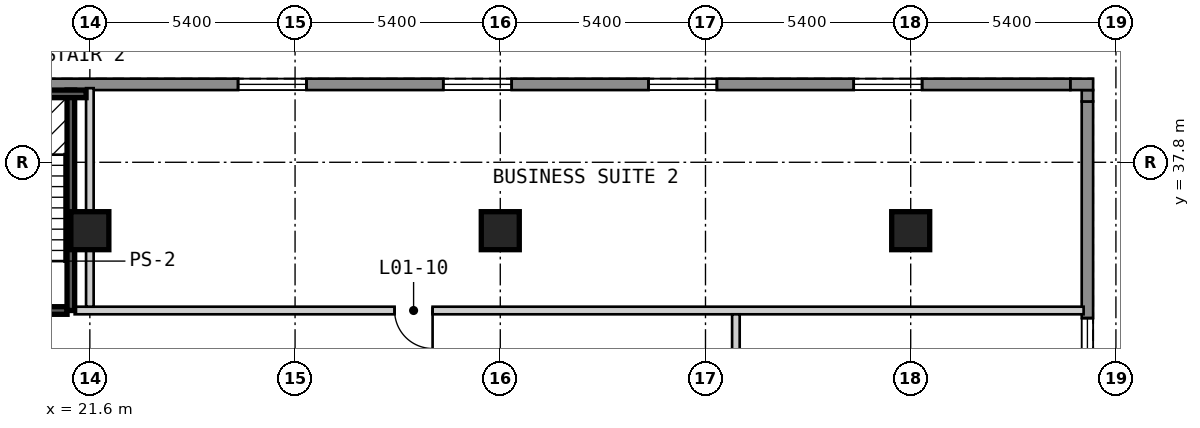
"""IFC4 building model, lengths in metres.
Left out: names, types, materials, properties, quantities, classifications, styles, units other than length and angle.
Written with IfcOpenShell. Run it as: python <this file> out.ifc"""

import sys

from ifc_helpers import new_model, si_unit, direction, frame, frame_2d, origin, origin_2d, place, context, subcontext, project, spatial, rectangle, extrude, element, fill, save


model = new_model("IFC4")
c1 = context("Model", 3, precision=1e-05, world=origin(), true_north=direction((0.0, 1.0)))
c2 = subcontext(c1, "Body", "Model", "MODEL_VIEW")
j1 = project(units=[si_unit("LENGTHUNIT", "METRE"), si_unit("PLANEANGLEUNIT", "RADIAN")], contexts=[c1])
p1 = place(None, origin())
s1 = spatial("IfcSite", under=j1, at=p1, CompositionType="ELEMENT")
p2 = place(p1, origin())
s2 = spatial("IfcBuilding", under=s1, at=p2, CompositionType="ELEMENT")
p3 = place(p2, frame((0.0, 0.0, 5.0)))
s3 = spatial("IfcBuildingStorey", under=s2, at=p3, CompositionType="ELEMENT", Elevation=5.0)
for number, where, z_axis, x_axis in (
    (1, (21.6, 36.0, 0.0), (0.0, 0.0, 1.0), (1.0, 0.0, 0.0)),
    (2, (32.4, 36.0, 0.0), (0.0, 0.0, 1.0), (1.0, 0.0, 0.0)),
    (3, (43.2, 36.0, 0.0), (0.0, 0.0, 1.0), (1.0, 0.0, 0.0)),
):
    element("IfcColumn", number, at=place(p3, frame(where, z_axis=z_axis, x_axis=x_axis)), inside=s3, PredefinedType="COLUMN", context=c2, shape_type="SweptSolid", body=[
        extrude(rectangle(XDim=1.0, YDim=1.0, at=origin_2d()), origin(), (0.0, 0.0, 1.0), 4.0),
    ])
p4 = place(p3, frame((47.85, -31.4, 0.0), z_axis=(0.0, 0.0, 1.0), x_axis=(0.0, 1.0, 0.0)))
e4 = element("IfcWall", 4, at=p4, inside=s3, PredefinedType="SOLIDWALL", context=c2, shape_type="SweptSolid", body=[
    extrude(rectangle(XDim=70.8, YDim=0.3, at=frame_2d((35.4, 0.0))), origin(), (0.0, 0.0, 1.0), 3.5),
])
p5 = place(p4, frame((3.9, 0.0, 0.9)))
e5 = element("IfcOpeningElement", 5, at=p5, cuts=e4, PredefinedType="OPENING", context=c2, shape_type="SweptSolid", body=[
    extrude(rectangle(XDim=1.8, YDim=2.4, at=frame_2d((0.9, 1.2))), frame((0.0, 0.16, 0.0), z_axis=(0.0, -1.0, 0.0), x_axis=(1.0, 0.0, 0.0)), (0.0, 0.0, 1.0), 0.32),
])
p6 = place(p4, frame((9.3, 0.0, 0.9)))
e6 = element("IfcOpeningElement", 6, at=p6, cuts=e4, PredefinedType="OPENING", context=c2, shape_type="SweptSolid", body=[
    extrude(rectangle(XDim=1.8, YDim=2.4, at=frame_2d((0.9, 1.2))), frame((0.0, 0.16, 0.0), z_axis=(0.0, -1.0, 0.0), x_axis=(1.0, 0.0, 0.0)), (0.0, 0.0, 1.0), 0.32),
])
p7 = place(p4, frame((14.7, 0.0, 0.9)))
e7 = element("IfcOpeningElement", 7, at=p7, cuts=e4, PredefinedType="OPENING", context=c2, shape_type="SweptSolid", body=[
    extrude(rectangle(XDim=1.8, YDim=2.4, at=frame_2d((0.9, 1.2))), frame((0.0, 0.16, 0.0), z_axis=(0.0, -1.0, 0.0), x_axis=(1.0, 0.0, 0.0)), (0.0, 0.0, 1.0), 0.32),
])
p8 = place(p4, frame((20.1, 0.0, 0.9)))
e8 = element("IfcOpeningElement", 8, at=p8, cuts=e4, PredefinedType="OPENING", context=c2, shape_type="SweptSolid", body=[
    extrude(rectangle(XDim=1.8, YDim=2.4, at=frame_2d((0.9, 1.2))), frame((0.0, 0.16, 0.0), z_axis=(0.0, -1.0, 0.0), x_axis=(1.0, 0.0, 0.0)), (0.0, 0.0, 1.0), 0.32),
])
p9 = place(p4, frame((25.5, 0.0, 0.9)))
e9 = element("IfcOpeningElement", 9, at=p9, cuts=e4, PredefinedType="OPENING", context=c2, shape_type="SweptSolid", body=[
    extrude(rectangle(XDim=1.8, YDim=2.4, at=frame_2d((0.9, 1.2))), frame((0.0, 0.16, 0.0), z_axis=(0.0, -1.0, 0.0), x_axis=(1.0, 0.0, 0.0)), (0.0, 0.0, 1.0), 0.32),
])
p10 = place(p4, frame((30.9, 0.0, 0.9)))
e10 = element("IfcOpeningElement", 10, at=p10, cuts=e4, PredefinedType="OPENING", context=c2, shape_type="SweptSolid", body=[
    extrude(rectangle(XDim=1.8, YDim=2.4, at=frame_2d((0.9, 1.2))), frame((0.0, 0.16, 0.0), z_axis=(0.0, -1.0, 0.0), x_axis=(1.0, 0.0, 0.0)), (0.0, 0.0, 1.0), 0.32),
])
p11 = place(p4, frame((36.3, 0.0, 0.9)))
e11 = element("IfcOpeningElement", 11, at=p11, cuts=e4, PredefinedType="OPENING", context=c2, shape_type="SweptSolid", body=[
    extrude(rectangle(XDim=1.8, YDim=2.4, at=frame_2d((0.9, 1.2))), frame((0.0, 0.16, 0.0), z_axis=(0.0, -1.0, 0.0), x_axis=(1.0, 0.0, 0.0)), (0.0, 0.0, 1.0), 0.32),
])
p12 = place(p4, frame((41.7, 0.0, 0.9)))
e12 = element("IfcOpeningElement", 12, at=p12, cuts=e4, PredefinedType="OPENING", context=c2, shape_type="SweptSolid", body=[
    extrude(rectangle(XDim=1.8, YDim=2.4, at=frame_2d((0.9, 1.2))), frame((0.0, 0.16, 0.0), z_axis=(0.0, -1.0, 0.0), x_axis=(1.0, 0.0, 0.0)), (0.0, 0.0, 1.0), 0.32),
])
p13 = place(p4, frame((47.1, 0.0, 0.9)))
e13 = element("IfcOpeningElement", 13, at=p13, cuts=e4, PredefinedType="OPENING", context=c2, shape_type="SweptSolid", body=[
    extrude(rectangle(XDim=1.8, YDim=2.4, at=frame_2d((0.9, 1.2))), frame((0.0, 0.16, 0.0), z_axis=(0.0, -1.0, 0.0), x_axis=(1.0, 0.0, 0.0)), (0.0, 0.0, 1.0), 0.32),
])
p14 = place(p4, frame((57.9, 0.0, 0.9)))
e14 = element("IfcOpeningElement", 14, at=p14, cuts=e4, PredefinedType="OPENING", context=c2, shape_type="SweptSolid", body=[
    extrude(rectangle(XDim=1.8, YDim=2.4, at=frame_2d((0.9, 1.2))), frame((0.0, 0.16, 0.0), z_axis=(0.0, -1.0, 0.0), x_axis=(1.0, 0.0, 0.0)), (0.0, 0.0, 1.0), 0.32),
])
p15 = place(p4, frame((63.3, 0.0, 0.9)))
e15 = element("IfcOpeningElement", 15, at=p15, cuts=e4, PredefinedType="OPENING", context=c2, shape_type="SweptSolid", body=[
    extrude(rectangle(XDim=1.8, YDim=2.4, at=frame_2d((0.9, 1.2))), frame((0.0, 0.16, 0.0), z_axis=(0.0, -1.0, 0.0), x_axis=(1.0, 0.0, 0.0)), (0.0, 0.0, 1.0), 0.32),
])
p16 = place(p3, frame((47.85, 39.4, 0.0), z_axis=(0.0, 0.0, 1.0), x_axis=(0.0, 1.0, 0.0)))
e16 = element("IfcWall", 16, at=p16, inside=s3, PredefinedType="SOLIDWALL", context=c2, shape_type="SweptSolid", body=[
    extrude(rectangle(XDim=0.3, YDim=0.3, at=frame_2d((0.15, 0.0))), origin(), (0.0, 0.0, 1.0), 3.5),
])
p17 = place(p3, frame((48.0, 39.85, 0.0), z_axis=(0.0, 0.0, 1.0), x_axis=(-1.0, 0.0, 0.0)))
e17 = element("IfcWall", 17, at=p17, inside=s3, PredefinedType="SOLIDWALL", context=c2, shape_type="SweptSolid", body=[
    extrude(rectangle(XDim=0.6, YDim=0.3, at=frame_2d((0.3, 0.0))), origin(), (0.0, 0.0, 1.0), 3.5),
])
p18 = place(p3, frame((47.4, 39.85, 0.0), z_axis=(0.0, 0.0, 1.0), x_axis=(-1.0, 0.0, 0.0)))
e18 = element("IfcWall", 18, at=p18, inside=s3, PredefinedType="SOLIDWALL", context=c2, shape_type="SweptSolid", body=[
    extrude(rectangle(XDim=94.8, YDim=0.3, at=frame_2d((47.4, 0.0))), origin(), (0.0, 0.0, 1.0), 3.5),
])
p19 = place(p18, frame((3.9, 0.0, 0.9)))
e19 = element("IfcOpeningElement", 19, at=p19, cuts=e18, PredefinedType="OPENING", context=c2, shape_type="SweptSolid", body=[
    extrude(rectangle(XDim=1.8, YDim=2.4, at=frame_2d((0.9, 1.2))), frame((0.0, 0.16, 0.0), z_axis=(0.0, -1.0, 0.0), x_axis=(1.0, 0.0, 0.0)), (0.0, 0.0, 1.0), 0.32),
])
p20 = place(p18, frame((9.3, 0.0, 0.9)))
e20 = element("IfcOpeningElement", 20, at=p20, cuts=e18, PredefinedType="OPENING", context=c2, shape_type="SweptSolid", body=[
    extrude(rectangle(XDim=1.8, YDim=2.4, at=frame_2d((0.9, 1.2))), frame((0.0, 0.16, 0.0), z_axis=(0.0, -1.0, 0.0), x_axis=(1.0, 0.0, 0.0)), (0.0, 0.0, 1.0), 0.32),
])
p21 = place(p18, frame((14.7, 0.0, 0.9)))
e21 = element("IfcOpeningElement", 21, at=p21, cuts=e18, PredefinedType="OPENING", context=c2, shape_type="SweptSolid", body=[
    extrude(rectangle(XDim=1.8, YDim=2.4, at=frame_2d((0.9, 1.2))), frame((0.0, 0.16, 0.0), z_axis=(0.0, -1.0, 0.0), x_axis=(1.0, 0.0, 0.0)), (0.0, 0.0, 1.0), 0.32),
])
p22 = place(p18, frame((20.1, 0.0, 0.9)))
e22 = element("IfcOpeningElement", 22, at=p22, cuts=e18, PredefinedType="OPENING", context=c2, shape_type="SweptSolid", body=[
    extrude(rectangle(XDim=1.8, YDim=2.4, at=frame_2d((0.9, 1.2))), frame((0.0, 0.16, 0.0), z_axis=(0.0, -1.0, 0.0), x_axis=(1.0, 0.0, 0.0)), (0.0, 0.0, 1.0), 0.32),
])
p23 = place(p18, frame((30.9, 0.0, 0.9)))
e23 = element("IfcOpeningElement", 23, at=p23, cuts=e18, PredefinedType="OPENING", context=c2, shape_type="SweptSolid", body=[
    extrude(rectangle(XDim=1.8, YDim=2.4, at=frame_2d((0.9, 1.2))), frame((0.0, 0.16, 0.0), z_axis=(0.0, -1.0, 0.0), x_axis=(1.0, 0.0, 0.0)), (0.0, 0.0, 1.0), 0.32),
])
p24 = place(p18, frame((36.3, 0.0, 0.9)))
e24 = element("IfcOpeningElement", 24, at=p24, cuts=e18, PredefinedType="OPENING", context=c2, shape_type="SweptSolid", body=[
    extrude(rectangle(XDim=1.8, YDim=2.4, at=frame_2d((0.9, 1.2))), frame((0.0, 0.16, 0.0), z_axis=(0.0, -1.0, 0.0), x_axis=(1.0, 0.0, 0.0)), (0.0, 0.0, 1.0), 0.32),
])
p25 = place(p18, frame((41.7, 0.0, 0.9)))
e25 = element("IfcOpeningElement", 25, at=p25, cuts=e18, PredefinedType="OPENING", context=c2, shape_type="SweptSolid", body=[
    extrude(rectangle(XDim=1.8, YDim=2.4, at=frame_2d((0.9, 1.2))), frame((0.0, 0.16, 0.0), z_axis=(0.0, -1.0, 0.0), x_axis=(1.0, 0.0, 0.0)), (0.0, 0.0, 1.0), 0.32),
])
p26 = place(p18, frame((47.1, 0.0, 0.9)))
e26 = element("IfcOpeningElement", 26, at=p26, cuts=e18, PredefinedType="OPENING", context=c2, shape_type="SweptSolid", body=[
    extrude(rectangle(XDim=1.8, YDim=2.4, at=frame_2d((0.9, 1.2))), frame((0.0, 0.16, 0.0), z_axis=(0.0, -1.0, 0.0), x_axis=(1.0, 0.0, 0.0)), (0.0, 0.0, 1.0), 0.32),
])
p27 = place(p18, frame((52.5, 0.0, 0.9)))
e27 = element("IfcOpeningElement", 27, at=p27, cuts=e18, PredefinedType="OPENING", context=c2, shape_type="SweptSolid", body=[
    extrude(rectangle(XDim=1.8, YDim=2.4, at=frame_2d((0.9, 1.2))), frame((0.0, 0.16, 0.0), z_axis=(0.0, -1.0, 0.0), x_axis=(1.0, 0.0, 0.0)), (0.0, 0.0, 1.0), 0.32),
])
p28 = place(p18, frame((57.9, 0.0, 0.9)))
e28 = element("IfcOpeningElement", 28, at=p28, cuts=e18, PredefinedType="OPENING", context=c2, shape_type="SweptSolid", body=[
    extrude(rectangle(XDim=1.8, YDim=2.4, at=frame_2d((0.9, 1.2))), frame((0.0, 0.16, 0.0), z_axis=(0.0, -1.0, 0.0), x_axis=(1.0, 0.0, 0.0)), (0.0, 0.0, 1.0), 0.32),
])
p29 = place(p18, frame((63.3, 0.0, 0.9)))
e29 = element("IfcOpeningElement", 29, at=p29, cuts=e18, PredefinedType="OPENING", context=c2, shape_type="SweptSolid", body=[
    extrude(rectangle(XDim=1.8, YDim=2.4, at=frame_2d((0.9, 1.2))), frame((0.0, 0.16, 0.0), z_axis=(0.0, -1.0, 0.0), x_axis=(1.0, 0.0, 0.0)), (0.0, 0.0, 1.0), 0.32),
])
p30 = place(p18, frame((74.1, 0.0, 0.9)))
e30 = element("IfcOpeningElement", 30, at=p30, cuts=e18, PredefinedType="OPENING", context=c2, shape_type="SweptSolid", body=[
    extrude(rectangle(XDim=1.8, YDim=2.4, at=frame_2d((0.9, 1.2))), frame((0.0, 0.16, 0.0), z_axis=(0.0, -1.0, 0.0), x_axis=(1.0, 0.0, 0.0)), (0.0, 0.0, 1.0), 0.32),
])
p31 = place(p18, frame((79.5, 0.0, 0.9)))
e31 = element("IfcOpeningElement", 31, at=p31, cuts=e18, PredefinedType="OPENING", context=c2, shape_type="SweptSolid", body=[
    extrude(rectangle(XDim=1.8, YDim=2.4, at=frame_2d((0.9, 1.2))), frame((0.0, 0.16, 0.0), z_axis=(0.0, -1.0, 0.0), x_axis=(1.0, 0.0, 0.0)), (0.0, 0.0, 1.0), 0.32),
])
p32 = place(p18, frame((84.9, 0.0, 0.9)))
e32 = element("IfcOpeningElement", 32, at=p32, cuts=e18, PredefinedType="OPENING", context=c2, shape_type="SweptSolid", body=[
    extrude(rectangle(XDim=1.8, YDim=2.4, at=frame_2d((0.9, 1.2))), frame((0.0, 0.16, 0.0), z_axis=(0.0, -1.0, 0.0), x_axis=(1.0, 0.0, 0.0)), (0.0, 0.0, 1.0), 0.32),
])
p33 = place(p18, frame((90.3, 0.0, 0.9)))
e33 = element("IfcOpeningElement", 33, at=p33, cuts=e18, PredefinedType="OPENING", context=c2, shape_type="SweptSolid", body=[
    extrude(rectangle(XDim=1.8, YDim=2.4, at=frame_2d((0.9, 1.2))), frame((0.0, 0.16, 0.0), z_axis=(0.0, -1.0, 0.0), x_axis=(1.0, 0.0, 0.0)), (0.0, 0.0, 1.0), 0.32),
])
p34 = place(p3, frame((-21.0, 33.9, 0.0), z_axis=(0.0, 0.0, 1.0), x_axis=(1.0, 0.0, 0.0)))
e34 = element("IfcWall", 34, at=p34, inside=s3, PredefinedType="SOLIDWALL", context=c2, shape_type="SweptSolid", body=[
    extrude(rectangle(XDim=42.0, YDim=0.2, at=frame_2d((21.0, 0.0))), origin(), (0.0, 0.0, 1.0), 3.5),
])
p35 = place(p34, frame((7.6, 0.0, 0.0)))
e35 = element("IfcOpeningElement", 35, at=p35, cuts=e34, PredefinedType="OPENING", context=c2, shape_type="SweptSolid", body=[
    extrude(rectangle(XDim=1.0, YDim=2.1, at=frame_2d((0.5, 1.05))), frame((0.0, 0.11, 0.0), z_axis=(0.0, -1.0, 0.0), x_axis=(1.0, 0.0, 0.0)), (0.0, 0.0, 1.0), 0.22),
])
p36 = place(p34, frame((25.85, 0.0, 0.0)))
e36 = element("IfcOpeningElement", 36, at=p36, cuts=e34, PredefinedType="OPENING", context=c2, shape_type="SweptSolid", body=[
    extrude(rectangle(XDim=1.0, YDim=2.1, at=frame_2d((0.5, 1.05))), frame((0.0, 0.11, 0.0), z_axis=(0.0, -1.0, 0.0), x_axis=(1.0, 0.0, 0.0)), (0.0, 0.0, 1.0), 0.22),
])
p37 = place(p34, frame((0.893, 0.0, 0.0)))
e37 = element("IfcOpeningElement", 37, at=p37, cuts=e34, PredefinedType="OPENING", context=c2, shape_type="SweptSolid", body=[
    extrude(rectangle(XDim=1.0, YDim=2.1, at=frame_2d((0.5, 1.05))), frame((0.0, 0.11, 0.0), z_axis=(0.0, -1.0, 0.0), x_axis=(1.0, 0.0, 0.0)), (0.0, 0.0, 1.0), 0.22),
])
p38 = place(p34, frame((40.107, 0.0, 0.0)))
e38 = element("IfcOpeningElement", 38, at=p38, cuts=e34, PredefinedType="OPENING", context=c2, shape_type="SweptSolid", body=[
    extrude(rectangle(XDim=1.0, YDim=2.1, at=frame_2d((0.5, 1.05))), frame((0.0, 0.11, 0.0), z_axis=(0.0, -1.0, 0.0), x_axis=(1.0, 0.0, 0.0)), (0.0, 0.0, 1.0), 0.22),
])
p39 = place(p3, frame((21.2, 33.9, 0.0), z_axis=(0.0, 0.0, 1.0), x_axis=(1.0, 0.0, 0.0)))
e39 = element("IfcWall", 39, at=p39, inside=s3, PredefinedType="PARTITIONING", context=c2, shape_type="SweptSolid", body=[
    extrude(rectangle(XDim=26.55, YDim=0.2, at=frame_2d((13.275, 0.0))), origin(), (0.0, 0.0, 1.0), 3.5),
])
p40 = place(p39, frame((8.419, 0.0, 0.0)))
e40 = element("IfcOpeningElement", 40, at=p40, cuts=e39, PredefinedType="OPENING", context=c2, shape_type="SweptSolid", body=[
    extrude(rectangle(XDim=1.0, YDim=2.1, at=frame_2d((0.5, 1.05))), frame((0.0, 0.11, 0.0), z_axis=(0.0, -1.0, 0.0), x_axis=(1.0, 0.0, 0.0)), (0.0, 0.0, 1.0), 0.22),
])
p41 = place(p3, frame((21.1, 33.9, 0.0), z_axis=(0.0, 0.0, 1.0), x_axis=(0.0, 1.0, 0.0)))
e41 = element("IfcWall", 41, at=p41, inside=s3, PredefinedType="SOLIDWALL", context=c2, shape_type="SweptSolid", body=[
    extrude(rectangle(XDim=5.8, YDim=0.2, at=frame_2d((2.9, 0.0))), origin(), (0.0, 0.0, 1.0), 3.5),
])
p42 = place(p3, frame((21.6, 34.0, 0.0), z_axis=(0.0, 0.0, 1.0), x_axis=(0.0, 1.0, 0.0)))
e42 = element("IfcWall", 42, at=p42, inside=s3, PredefinedType="PARTITIONING", context=c2, shape_type="SweptSolid", body=[
    extrude(rectangle(XDim=5.75, YDim=0.2, at=frame_2d((2.875, 0.0))), origin(), (0.0, 0.0, 1.0), 3.5),
])
p43 = place(p3, frame((38.6, -31.75, 0.0), z_axis=(0.0, 0.0, 1.0), x_axis=(0.0, 1.0, 0.0)))
e43 = element("IfcWall", 43, at=p43, inside=s3, PredefinedType="PARTITIONING", context=c2, shape_type="SweptSolid", body=[
    extrude(rectangle(XDim=65.55, YDim=0.2, at=frame_2d((32.775, 0.0))), origin(), (0.0, 0.0, 1.0), 3.5),
])
p44 = place(p43, frame((4.794, 0.0, 0.0), z_axis=(0.0, 0.0, 1.0), x_axis=(-1.0, 0.0, 0.0)))
e44 = element("IfcOpeningElement", 44, at=p44, cuts=e43, PredefinedType="OPENING", context=c2, shape_type="SweptSolid", body=[
    extrude(rectangle(XDim=1.0, YDim=2.1, at=frame_2d((0.5, 1.05))), frame((0.0, 0.11, 0.0), z_axis=(0.0, -1.0, 0.0), x_axis=(1.0, 0.0, 0.0)), (0.0, 0.0, 1.0), 0.22),
])
p45 = place(p43, frame((30.689, 0.0, 0.0), z_axis=(0.0, 0.0, 1.0), x_axis=(-1.0, 0.0, 0.0)))
e45 = element("IfcOpeningElement", 45, at=p45, cuts=e43, PredefinedType="OPENING", context=c2, shape_type="SweptSolid", body=[
    extrude(rectangle(XDim=1.0, YDim=2.1, at=frame_2d((0.5, 1.05))), frame((0.0, 0.11, 0.0), z_axis=(0.0, -1.0, 0.0), x_axis=(1.0, 0.0, 0.0)), (0.0, 0.0, 1.0), 0.22),
])
p46 = place(p43, frame((47.376, 0.0, 0.0), z_axis=(0.0, 0.0, 1.0), x_axis=(-1.0, 0.0, 0.0)))
e46 = element("IfcOpeningElement", 46, at=p46, cuts=e43, PredefinedType="OPENING", context=c2, shape_type="SweptSolid", body=[
    extrude(rectangle(XDim=1.0, YDim=2.1, at=frame_2d((0.5, 1.05))), frame((0.0, 0.11, 0.0), z_axis=(0.0, -1.0, 0.0), x_axis=(1.0, 0.0, 0.0)), (0.0, 0.0, 1.0), 0.22),
])
p47 = place(p3, frame((18.25, 39.6, 0.0), z_axis=(0.0, 0.0, 1.0), x_axis=(1.0, 0.0, 0.0)))
e47 = element("IfcWall", 47, at=p47, inside=s3, PredefinedType="SOLIDWALL", context=c2, shape_type="SweptSolid", body=[
    extrude(rectangle(XDim=3.25, YDim=0.2, at=frame_2d((1.625, 0.0))), origin(), (0.0, 0.0, 1.0), 3.5),
])
p48 = place(p15, origin())
e48 = element("IfcWindow", 48, at=p48, inside=s3, PartitioningType="SINGLE_PANEL", PredefinedType="WINDOW", context=c2, shape_type="SweptSolid", body=[
    extrude(rectangle(XDim=1.8, YDim=2.4, at=frame_2d((0.9, 1.2))), frame((0.0, 0.03, 0.0), z_axis=(0.0, -1.0, 0.0), x_axis=(1.0, 0.0, 0.0)), (0.0, 0.0, 1.0), 0.06),
])
fill(e15, e48)
p49 = place(p19, origin())
e49 = element("IfcWindow", 49, at=p49, inside=s3, PartitioningType="SINGLE_PANEL", PredefinedType="WINDOW", context=c2, shape_type="SweptSolid", body=[
    extrude(rectangle(XDim=1.8, YDim=2.4, at=frame_2d((0.9, 1.2))), frame((0.0, 0.03, 0.0), z_axis=(0.0, -1.0, 0.0), x_axis=(1.0, 0.0, 0.0)), (0.0, 0.0, 1.0), 0.06),
])
fill(e19, e49)
p50 = place(p20, origin())
e50 = element("IfcWindow", 50, at=p50, inside=s3, PartitioningType="SINGLE_PANEL", PredefinedType="WINDOW", context=c2, shape_type="SweptSolid", body=[
    extrude(rectangle(XDim=1.8, YDim=2.4, at=frame_2d((0.9, 1.2))), frame((0.0, 0.03, 0.0), z_axis=(0.0, -1.0, 0.0), x_axis=(1.0, 0.0, 0.0)), (0.0, 0.0, 1.0), 0.06),
])
fill(e20, e50)
p51 = place(p21, origin())
e51 = element("IfcWindow", 51, at=p51, inside=s3, PartitioningType="SINGLE_PANEL", PredefinedType="WINDOW", context=c2, shape_type="SweptSolid", body=[
    extrude(rectangle(XDim=1.8, YDim=2.4, at=frame_2d((0.9, 1.2))), frame((0.0, 0.03, 0.0), z_axis=(0.0, -1.0, 0.0), x_axis=(1.0, 0.0, 0.0)), (0.0, 0.0, 1.0), 0.06),
])
fill(e21, e51)
p52 = place(p22, origin())
e52 = element("IfcWindow", 52, at=p52, inside=s3, PartitioningType="SINGLE_PANEL", PredefinedType="WINDOW", context=c2, shape_type="SweptSolid", body=[
    extrude(rectangle(XDim=1.8, YDim=2.4, at=frame_2d((0.9, 1.2))), frame((0.0, 0.03, 0.0), z_axis=(0.0, -1.0, 0.0), x_axis=(1.0, 0.0, 0.0)), (0.0, 0.0, 1.0), 0.06),
])
fill(e22, e52)
p53 = place(p40, origin())
e53 = element("IfcDoor", 53, at=p53, inside=s3, OperationType="SINGLE_SWING_RIGHT", PredefinedType="DOOR", context=c2, shape_type="SweptSolid", body=[
    extrude(rectangle(XDim=1.0, YDim=2.1, at=frame_2d((0.5, 1.05))), frame((0.0, 0.025, 0.0), z_axis=(0.0, -1.0, 0.0), x_axis=(1.0, 0.0, 0.0)), (0.0, 0.0, 1.0), 0.05),
])
fill(e40, e53)
save(model, sys.argv[1])
